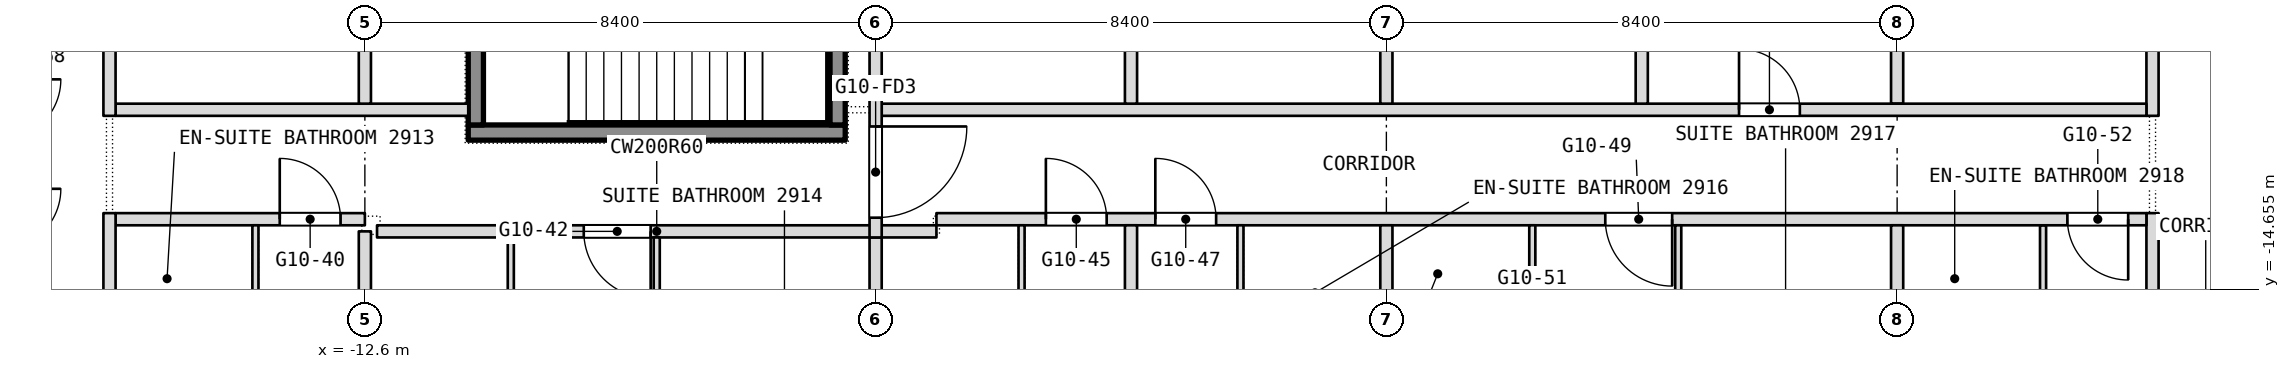
"""IFC4 building model, lengths in metres.
Left out: names, types, materials, properties, quantities, classifications, styles, units other than length and angle.
Written with IfcOpenShell. Run it as: python <this file> out.ifc"""

import sys

from ifc_helpers import new_model, si_unit, direction, frame, frame_2d, origin, place, context, subcontext, project, spatial, rectangle, extrude, element, fill, save


model = new_model("IFC4")
c1 = context("Model", 3, precision=1e-05, world=origin(), true_north=direction((0.0, 1.0)))
c2 = subcontext(c1, "Body", "Model", "MODEL_VIEW")
j1 = project(units=[si_unit("LENGTHUNIT", "METRE"), si_unit("PLANEANGLEUNIT", "RADIAN")], contexts=[c1])
p1 = place(None, origin())
s1 = spatial("IfcSite", under=j1, at=p1, CompositionType="ELEMENT")
p2 = place(p1, origin())
s2 = spatial("IfcBuilding", under=s1, at=p2, CompositionType="ELEMENT")
p3 = place(p2, frame((0.0, 0.0, 130.1)))
s3 = spatial("IfcBuildingStorey", under=s2, at=p3, CompositionType="ELEMENT", Elevation=130.1)
p4 = place(p3, frame((16.8, -22.186, 0.0), z_axis=(0.0, 0.0, 1.0), x_axis=(0.0, 1.0, 0.0)))
e1 = element("IfcWall", 1, at=p4, inside=s3, PredefinedType="PARTITIONING", context=c2, shape_type="SweptSolid", body=[
    extrude(rectangle(XDim=8.786, YDim=0.2, at=frame_2d((4.393, 0.0))), origin(), (0.0, 0.0, 1.0), 3.34),
])
p5 = place(p3, frame((16.8, -11.8, 0.0), z_axis=(0.0, 0.0, 1.0), x_axis=(0.0, 1.0, 0.0)))
e2 = element("IfcWall", 2, at=p5, inside=s3, PredefinedType="PARTITIONING", context=c2, shape_type="SweptSolid", body=[
    extrude(rectangle(XDim=9.9, YDim=0.2, at=frame_2d((4.95, 0.0))), origin(), (0.0, 0.0, 1.0), 3.34),
])
p6 = place(p3, frame((15.0, -16.25, 0.0), z_axis=(0.0, 0.0, 1.0), x_axis=(0.0, 1.0, 0.0)))
e3 = element("IfcWall", 3, at=p6, inside=s3, PredefinedType="PARTITIONING", context=c2, shape_type="SweptSolid", body=[
    extrude(rectangle(XDim=2.65, YDim=0.1, at=frame_2d((1.325, 0.0))), origin(), (0.0, 0.0, 1.0), 3.34),
])
p7 = place(p3, frame((-12.4, -13.7, 0.0), z_axis=(0.0, 0.0, 1.0), x_axis=(1.0, 0.0, 0.0)))
e4 = element("IfcWall", 4, at=p7, inside=s3, PredefinedType="PARTITIONING", context=c2, shape_type="SweptSolid", body=[
    extrude(rectangle(XDim=9.2, YDim=0.2, at=frame_2d((4.6, 0.0))), origin(), (0.0, 0.0, 1.0), 3.34),
])
p8 = place(p7, frame((3.4, 0.0, 0.0)))
e5 = element("IfcOpeningElement", 5, at=p8, cuts=e4, PredefinedType="OPENING", context=c2, shape_type="SweptSolid", body=[
    extrude(rectangle(XDim=1.1, YDim=2.1, at=frame_2d((0.55, 1.05))), frame((0.0, 0.1, 0.0), z_axis=(0.0, -1.0, 0.0), x_axis=(1.0, 0.0, 0.0)), (0.0, 0.0, 1.0), 0.2),
])
p9 = place(p3, frame((-16.7, -13.5, 0.0), z_axis=(0.0, 0.0, 1.0), x_axis=(1.0, 0.0, 0.0)))
e6 = element("IfcWall", 6, at=p9, inside=s3, PredefinedType="PARTITIONING", context=c2, shape_type="SweptSolid", body=[
    extrude(rectangle(XDim=4.1, YDim=0.2, at=frame_2d((2.05, 0.0))), origin(), (0.0, 0.0, 1.0), 3.34),
])
p10 = place(p9, frame((2.7, 0.0, 0.0)))
e7 = element("IfcOpeningElement", 7, at=p10, cuts=e6, PredefinedType="OPENING", context=c2, shape_type="SweptSolid", body=[
    extrude(rectangle(XDim=1.0, YDim=2.1, at=frame_2d((0.5, 1.05))), frame((0.0, 0.1, 0.0), z_axis=(0.0, -1.0, 0.0), x_axis=(1.0, 0.0, 0.0)), (0.0, 0.0, 1.0), 0.2),
])
p11 = place(p3, frame((-3.2, -13.5, 0.0), z_axis=(0.0, 0.0, 1.0), x_axis=(1.0, 0.0, 0.0)))
e8 = element("IfcWall", 8, at=p11, inside=s3, PredefinedType="PARTITIONING", context=c2, shape_type="SweptSolid", body=[
    extrude(rectangle(XDim=19.9, YDim=0.2, at=frame_2d((9.95, 0.0))), origin(), (0.0, 0.0, 1.0), 3.34),
])
p12 = place(p11, frame((1.8, 0.0, 0.0)))
e9 = element("IfcOpeningElement", 9, at=p12, cuts=e8, PredefinedType="OPENING", context=c2, shape_type="SweptSolid", body=[
    extrude(rectangle(XDim=1.0, YDim=2.1, at=frame_2d((0.5, 1.05))), frame((0.0, 0.1, 0.0), z_axis=(0.0, -1.0, 0.0), x_axis=(1.0, 0.0, 0.0)), (0.0, 0.0, 1.0), 0.2),
])
p13 = place(p11, frame((3.6, 0.0, 0.0)))
e10 = element("IfcOpeningElement", 10, at=p13, cuts=e8, PredefinedType="OPENING", context=c2, shape_type="SweptSolid", body=[
    extrude(rectangle(XDim=1.0, YDim=2.1, at=frame_2d((0.5, 1.05))), frame((0.0, 0.1, 0.0), z_axis=(0.0, -1.0, 0.0), x_axis=(1.0, 0.0, 0.0)), (0.0, 0.0, 1.0), 0.2),
])
p14 = place(p11, frame((11.0, 0.0, 0.0)))
e11 = element("IfcOpeningElement", 11, at=p14, cuts=e8, PredefinedType="OPENING", context=c2, shape_type="SweptSolid", body=[
    extrude(rectangle(XDim=1.1, YDim=2.1, at=frame_2d((0.55, 1.05))), frame((0.0, 0.1, 0.0), z_axis=(0.0, -1.0, 0.0), x_axis=(1.0, 0.0, 0.0)), (0.0, 0.0, 1.0), 0.2),
])
p15 = place(p11, frame((18.6, 0.0, 0.0)))
e12 = element("IfcOpeningElement", 12, at=p15, cuts=e8, PredefinedType="OPENING", context=c2, shape_type="SweptSolid", body=[
    extrude(rectangle(XDim=1.0, YDim=2.1, at=frame_2d((0.5, 1.05))), frame((0.0, 0.1, 0.0), z_axis=(0.0, -1.0, 0.0), x_axis=(1.0, 0.0, 0.0)), (0.0, 0.0, 1.0), 0.2),
])
p16 = place(p3, frame((12.6, -21.175, 0.0), z_axis=(0.0, 0.0, 1.0), x_axis=(0.0, 1.0, 0.0)))
e13 = element("IfcWall", 13, at=p16, inside=s3, PredefinedType="PARTITIONING", context=c2, shape_type="SweptSolid", body=[
    extrude(rectangle(XDim=7.575, YDim=0.2, at=frame_2d((3.788, 0.0))), origin(), (0.0, 0.0, 1.0), 3.34),
])
p17 = place(p3, frame((12.6, -11.6, 0.0), z_axis=(0.0, 0.0, 1.0), x_axis=(0.0, 1.0, 0.0)))
e14 = element("IfcWall", 14, at=p17, inside=s3, PredefinedType="PARTITIONING", context=c2, shape_type="SweptSolid", body=[
    extrude(rectangle(XDim=3.9, YDim=0.2, at=frame_2d((1.95, 0.0))), origin(), (0.0, 0.0, 1.0), 3.34),
])
p18 = place(p3, frame((-16.7, -11.7, 0.0), z_axis=(0.0, 0.0, 1.0), x_axis=(1.0, 0.0, 0.0)))
e15 = element("IfcWall", 15, at=p18, inside=s3, PredefinedType="PARTITIONING", context=c2, shape_type="SweptSolid", body=[
    extrude(rectangle(XDim=5.8, YDim=0.2, at=frame_2d((2.9, 0.0))), origin(), (0.0, 0.0, 1.0), 3.34),
])
p19 = place(p3, frame((-4.1, -11.7, 0.0), z_axis=(0.0, 0.0, 1.0), x_axis=(1.0, 0.0, 0.0)))
e16 = element("IfcWall", 16, at=p19, inside=s3, PredefinedType="PARTITIONING", context=c2, shape_type="SweptSolid", body=[
    extrude(rectangle(XDim=20.8, YDim=0.2, at=frame_2d((10.4, 0.0))), origin(), (0.0, 0.0, 1.0), 3.34),
])
p20 = place(p19, frame((14.1, 0.0, 0.0)))
e17 = element("IfcOpeningElement", 17, at=p20, cuts=e16, PredefinedType="OPENING", context=c2, shape_type="SweptSolid", body=[
    extrude(rectangle(XDim=1.0, YDim=2.1, at=frame_2d((0.5, 1.05))), frame((0.0, 0.1, 0.0), z_axis=(0.0, -1.0, 0.0), x_axis=(1.0, 0.0, 0.0)), (0.0, 0.0, 1.0), 0.2),
])
p21 = place(p3, frame((9.0, -18.05, 0.0), z_axis=(0.0, 0.0, 1.0), x_axis=(0.0, 1.0, 0.0)))
e18 = element("IfcWall", 18, at=p21, inside=s3, PredefinedType="PARTITIONING", context=c2, shape_type="SweptSolid", body=[
    extrude(rectangle(XDim=4.45, YDim=0.1, at=frame_2d((2.225, 0.0))), origin(), (0.0, 0.0, 1.0), 3.34),
])
p22 = place(p3, frame((8.4, -11.6, 0.0), z_axis=(0.0, 0.0, 1.0), x_axis=(0.0, 1.0, 0.0)))
e19 = element("IfcWall", 19, at=p22, inside=s3, PredefinedType="PARTITIONING", context=c2, shape_type="SweptSolid", body=[
    extrude(rectangle(XDim=3.8, YDim=0.2, at=frame_2d((1.9, 0.0))), origin(), (0.0, 0.0, 1.0), 3.34),
])
p23 = place(p3, frame((6.6, -17.05, 0.0), z_axis=(0.0, 0.0, 1.0), x_axis=(0.0, 1.0, 0.0)))
e20 = element("IfcWall", 20, at=p23, inside=s3, PredefinedType="PARTITIONING", context=c2, shape_type="SweptSolid", body=[
    extrude(rectangle(XDim=3.45, YDim=0.1, at=frame_2d((1.725, 0.0))), origin(), (0.0, 0.0, 1.0), 3.34),
])
p24 = place(p23, frame((1.12, 0.0, 0.0)))
e21 = element("IfcOpeningElement", 21, at=p24, cuts=e20, PredefinedType="OPENING", context=c2, shape_type="SweptSolid", body=[
    extrude(rectangle(XDim=0.9, YDim=2.1, at=frame_2d((0.45, 1.05))), frame((0.0, 0.05, 0.0), z_axis=(0.0, -1.0, 0.0), x_axis=(1.0, 0.0, 0.0)), (0.0, 0.0, 1.0), 0.1),
])
p25 = place(p3, frame((4.2, -23.3, 0.0), z_axis=(0.0, 0.0, 1.0), x_axis=(0.0, 1.0, 0.0)))
e22 = element("IfcWall", 22, at=p25, inside=s3, PredefinedType="PARTITIONING", context=c2, shape_type="SweptSolid", body=[
    extrude(rectangle(XDim=9.7, YDim=0.2, at=frame_2d((4.85, 0.0))), origin(), (0.0, 0.0, 1.0), 3.34),
])
p26 = place(p3, frame((4.2, -11.6, 0.0), z_axis=(0.0, 0.0, 1.0), x_axis=(0.0, 1.0, 0.0)))
e23 = element("IfcWall", 23, at=p26, inside=s3, PredefinedType="PARTITIONING", context=c2, shape_type="SweptSolid", body=[
    extrude(rectangle(XDim=9.7, YDim=0.2, at=frame_2d((4.85, 0.0))), origin(), (0.0, 0.0, 1.0), 3.34),
])
p27 = place(p3, frame((1.8, -16.95, 0.0), z_axis=(0.0, 0.0, 1.0), x_axis=(0.0, 1.0, 0.0)))
e24 = element("IfcWall", 24, at=p27, inside=s3, PredefinedType="PARTITIONING", context=c2, shape_type="SweptSolid", body=[
    extrude(rectangle(XDim=3.35, YDim=0.1, at=frame_2d((1.675, 0.0))), origin(), (0.0, 0.0, 1.0), 3.34),
])
p28 = place(p3, frame((0.0, -23.3, 0.0), z_axis=(0.0, 0.0, 1.0), x_axis=(0.0, 1.0, 0.0)))
e25 = element("IfcWall", 25, at=p28, inside=s3, PredefinedType="PARTITIONING", context=c2, shape_type="SweptSolid", body=[
    extrude(rectangle(XDim=9.7, YDim=0.2, at=frame_2d((4.85, 0.0))), origin(), (0.0, 0.0, 1.0), 3.34),
])
p29 = place(p3, frame((0.0, -11.6, 0.0), z_axis=(0.0, 0.0, 1.0), x_axis=(0.0, 1.0, 0.0)))
e26 = element("IfcWall", 26, at=p29, inside=s3, PredefinedType="PARTITIONING", context=c2, shape_type="SweptSolid", body=[
    extrude(rectangle(XDim=9.7, YDim=0.2, at=frame_2d((4.85, 0.0))), origin(), (0.0, 0.0, 1.0), 3.34),
])
p30 = place(p3, frame((-1.8, -16.85, 0.0), z_axis=(0.0, 0.0, 1.0), x_axis=(0.0, 1.0, 0.0)))
e27 = element("IfcWall", 27, at=p30, inside=s3, PredefinedType="PARTITIONING", context=c2, shape_type="SweptSolid", body=[
    extrude(rectangle(XDim=3.25, YDim=0.1, at=frame_2d((1.625, 0.0))), origin(), (0.0, 0.0, 1.0), 3.34),
])
p31 = place(p3, frame((-4.2, -23.3, 0.0), z_axis=(0.0, 0.0, 1.0), x_axis=(0.0, 1.0, 0.0)))
e28 = element("IfcWall", 28, at=p31, inside=s3, PredefinedType="PARTITIONING", context=c2, shape_type="SweptSolid", body=[
    extrude(rectangle(XDim=9.5, YDim=0.2, at=frame_2d((4.75, 0.0))), origin(), (0.0, 0.0, 1.0), 3.34),
])
p32 = place(p3, frame((-4.2, -13.8, 0.0), z_axis=(0.0, 0.0, 1.0), x_axis=(0.0, 1.0, 0.0)))
e29 = element("IfcWall", 29, at=p32, inside=s3, PredefinedType="PARTITIONING", context=c2, shape_type="SweptSolid", body=[
    extrude(rectangle(XDim=13.8, YDim=0.2, at=frame_2d((6.9, 0.0))), origin(), (0.0, 0.0, 1.0), 3.34),
])
p33 = place(p32, frame((12.15, 0.0, 0.0)))
e30 = element("IfcOpeningElement", 30, at=p33, cuts=e29, PredefinedType="OPENING", context=c2, shape_type="SweptSolid", body=[
    extrude(rectangle(XDim=1.5, YDim=2.1, at=frame_2d((0.75, 1.05))), frame((0.0, 0.1, 0.0), z_axis=(0.0, -1.0, 0.0), x_axis=(1.0, 0.0, 0.0)), (0.0, 0.0, 1.0), 0.2),
])
p34 = place(p32, frame((0.325, 0.0, 0.0)))
e31 = element("IfcOpeningElement", 31, at=p34, cuts=e29, PredefinedType="OPENING", context=c2, shape_type="SweptSolid", body=[
    extrude(rectangle(XDim=1.5, YDim=2.1, at=frame_2d((0.75, 1.05))), frame((0.0, 0.1, 0.0), z_axis=(0.0, -1.0, 0.0), x_axis=(1.0, 0.0, 0.0)), (0.0, 0.0, 1.0), 0.2),
])
p35 = place(p3, frame((-7.8, -17.35, 0.0), z_axis=(0.0, 0.0, 1.0), x_axis=(0.0, 1.0, 0.0)))
e32 = element("IfcWall", 32, at=p35, inside=s3, PredefinedType="PARTITIONING", context=c2, shape_type="SweptSolid", body=[
    extrude(rectangle(XDim=3.55, YDim=0.1, at=frame_2d((1.775, 0.0))), origin(), (0.0, 0.0, 1.0), 3.34),
])
p36 = place(p3, frame((-10.2, -17.25, 0.0), z_axis=(0.0, 0.0, 1.0), x_axis=(0.0, 1.0, 0.0)))
e33 = element("IfcWall", 33, at=p36, inside=s3, PredefinedType="PARTITIONING", context=c2, shape_type="SweptSolid", body=[
    extrude(rectangle(XDim=3.45, YDim=0.1, at=frame_2d((1.725, 0.0))), origin(), (0.0, 0.0, 1.0), 3.34),
])
p37 = place(p3, frame((-12.6, -21.175, 0.0), z_axis=(0.0, 0.0, 1.0), x_axis=(0.0, 1.0, 0.0)))
e34 = element("IfcWall", 34, at=p37, inside=s3, PredefinedType="PARTITIONING", context=c2, shape_type="SweptSolid", body=[
    extrude(rectangle(XDim=7.475, YDim=0.2, at=frame_2d((3.738, 0.0))), origin(), (0.0, 0.0, 1.0), 3.34),
])
p38 = place(p3, frame((-12.6, -11.6, 0.0), z_axis=(0.0, 0.0, 1.0), x_axis=(0.0, 1.0, 0.0)))
e35 = element("IfcWall", 35, at=p38, inside=s3, PredefinedType="PARTITIONING", context=c2, shape_type="SweptSolid", body=[
    extrude(rectangle(XDim=9.7, YDim=0.2, at=frame_2d((4.85, 0.0))), origin(), (0.0, 0.0, 1.0), 3.34),
])
p39 = place(p3, frame((-14.4, -16.25, 0.0), z_axis=(0.0, 0.0, 1.0), x_axis=(0.0, 1.0, 0.0)))
e36 = element("IfcWall", 36, at=p39, inside=s3, PredefinedType="PARTITIONING", context=c2, shape_type="SweptSolid", body=[
    extrude(rectangle(XDim=2.65, YDim=0.1, at=frame_2d((1.325, 0.0))), origin(), (0.0, 0.0, 1.0), 3.34),
])
p40 = place(p3, frame((-16.8, -22.186, 0.0), z_axis=(0.0, 0.0, 1.0), x_axis=(0.0, 1.0, 0.0)))
e37 = element("IfcWall", 37, at=p40, inside=s3, PredefinedType="PARTITIONING", context=c2, shape_type="SweptSolid", body=[
    extrude(rectangle(XDim=8.786, YDim=0.2, at=frame_2d((4.393, 0.0))), origin(), (0.0, 0.0, 1.0), 3.34),
])
p41 = place(p3, frame((-16.8, -11.8, 0.0), z_axis=(0.0, 0.0, 1.0), x_axis=(0.0, 1.0, 0.0)))
e38 = element("IfcWall", 38, at=p41, inside=s3, PredefinedType="PARTITIONING", context=c2, shape_type="SweptSolid", body=[
    extrude(rectangle(XDim=9.9, YDim=0.2, at=frame_2d((4.95, 0.0))), origin(), (0.0, 0.0, 1.0), 3.34),
])
p42 = place(p3, frame((-10.9, -12.075, 0.1), z_axis=(0.0, 0.0, 1.0), x_axis=(1.0, 0.0, 0.0)))
e39 = element("IfcWall", 39, at=p42, inside=s3, PredefinedType="SHEAR", context=c2, shape_type="SweptSolid", body=[
    extrude(rectangle(XDim=6.2, YDim=0.25, at=frame_2d((3.1, 0.0))), origin(), (0.0, 0.0, 1.0), 3.6),
])
for number, where, z_axis, x_axis in (
    (40, (-10.775, -11.95, 0.1), (0.0, 0.0, 1.0), (0.0, 1.0, 0.0)),
    (41, (-4.825, -11.95, 0.1), (0.0, 0.0, 1.0), (0.0, 1.0, 0.0)),
):
    element("IfcWall", number, at=place(p3, frame(where, z_axis=z_axis, x_axis=x_axis)), inside=s3, PredefinedType="SHEAR", context=c2, shape_type="SweptSolid", body=[
        extrude(rectangle(XDim=2.9, YDim=0.25, at=frame_2d((1.45, 0.0))), origin(), (0.0, 0.0, 1.0), 3.6),
    ])
p43 = place(p8, origin())
e42 = element("IfcDoor", 42, at=p43, inside=s3, OperationType="SINGLE_SWING_LEFT", PredefinedType="DOOR", context=c2, shape_type="SweptSolid", body=[
    extrude(rectangle(XDim=1.1, YDim=2.1, at=frame_2d((0.55, 1.05))), frame((0.0, 0.025, 0.0), z_axis=(0.0, -1.0, 0.0), x_axis=(1.0, 0.0, 0.0)), (0.0, 0.0, 1.0), 0.05),
])
fill(e5, e42)
p44 = place(p10, origin())
e43 = element("IfcDoor", 43, at=p44, inside=s3, OperationType="SINGLE_SWING_RIGHT", PredefinedType="DOOR", context=c2, shape_type="SweptSolid", body=[
    extrude(rectangle(XDim=1.0, YDim=2.1, at=frame_2d((0.5, 1.05))), frame((0.0, 0.025, 0.0), z_axis=(0.0, -1.0, 0.0), x_axis=(1.0, 0.0, 0.0)), (0.0, 0.0, 1.0), 0.05),
])
fill(e7, e43)
p45 = place(p12, origin())
e44 = element("IfcDoor", 44, at=p45, inside=s3, OperationType="SINGLE_SWING_LEFT", PredefinedType="DOOR", context=c2, shape_type="SweptSolid", body=[
    extrude(rectangle(XDim=1.0, YDim=2.1, at=frame_2d((0.5, 1.05))), frame((0.0, 0.025, 0.0), z_axis=(0.0, -1.0, 0.0), x_axis=(1.0, 0.0, 0.0)), (0.0, 0.0, 1.0), 0.05),
])
fill(e9, e44)
p46 = place(p13, origin())
e45 = element("IfcDoor", 45, at=p46, inside=s3, OperationType="SINGLE_SWING_LEFT", PredefinedType="DOOR", context=c2, shape_type="SweptSolid", body=[
    extrude(rectangle(XDim=1.0, YDim=2.1, at=frame_2d((0.5, 1.05))), frame((0.0, 0.025, 0.0), z_axis=(0.0, -1.0, 0.0), x_axis=(1.0, 0.0, 0.0)), (0.0, 0.0, 1.0), 0.05),
])
fill(e10, e45)
p47 = place(p14, origin())
e46 = element("IfcDoor", 46, at=p47, inside=s3, OperationType="SINGLE_SWING_LEFT", PredefinedType="DOOR", context=c2, shape_type="SweptSolid", body=[
    extrude(rectangle(XDim=1.1, YDim=2.1, at=frame_2d((0.55, 1.05))), frame((0.0, 0.025, 0.0), z_axis=(0.0, -1.0, 0.0), x_axis=(1.0, 0.0, 0.0)), (0.0, 0.0, 1.0), 0.05),
])
fill(e11, e46)
p48 = place(p15, origin())
e47 = element("IfcDoor", 47, at=p48, inside=s3, OperationType="SINGLE_SWING_LEFT", PredefinedType="DOOR", context=c2, shape_type="SweptSolid", body=[
    extrude(rectangle(XDim=1.0, YDim=2.1, at=frame_2d((0.5, 1.05))), frame((0.0, 0.025, 0.0), z_axis=(0.0, -1.0, 0.0), x_axis=(1.0, 0.0, 0.0)), (0.0, 0.0, 1.0), 0.05),
])
fill(e12, e47)
p49 = place(p20, origin())
e48 = element("IfcDoor", 48, at=p49, inside=s3, OperationType="SINGLE_SWING_LEFT", PredefinedType="DOOR", context=c2, shape_type="SweptSolid", body=[
    extrude(rectangle(XDim=1.0, YDim=2.1, at=frame_2d((0.5, 1.05))), frame((0.0, 0.025, 0.0), z_axis=(0.0, -1.0, 0.0), x_axis=(1.0, 0.0, 0.0)), (0.0, 0.0, 1.0), 0.05),
])
fill(e17, e48)
p50 = place(p34, origin())
e49 = element("IfcDoor", 49, at=p50, inside=s3, OperationType="DOUBLE_DOOR_DOUBLE_SWING", PredefinedType="DOOR", context=c2, shape_type="SweptSolid", body=[
    extrude(rectangle(XDim=1.5, YDim=2.1, at=frame_2d((0.75, 1.05))), frame((0.0, 0.025, 0.0), z_axis=(0.0, -1.0, 0.0), x_axis=(1.0, 0.0, 0.0)), (0.0, 0.0, 1.0), 0.05),
])
fill(e31, e49)
save(model, sys.argv[1])
